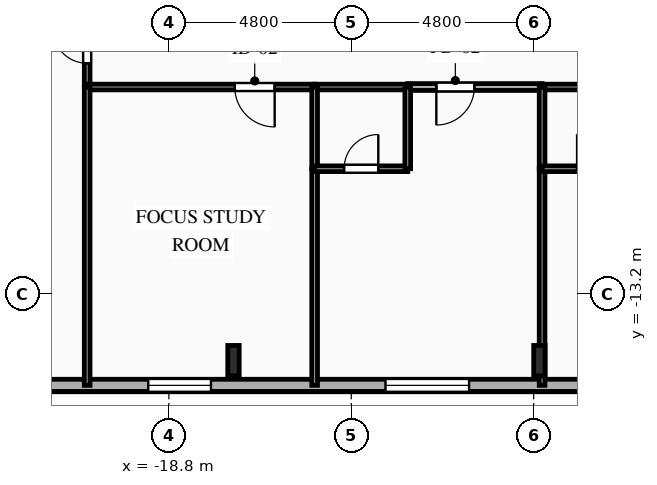
"""IFC4 building model, lengths in metres.
Left out: names, types, materials, properties, quantities, classifications, styles, units other than length and angle.
Written with IfcOpenShell. Run it as: python <this file> out.ifc"""

import sys

from ifc_helpers import new_model, si_unit, direction, frame, frame_2d, origin, origin_2d, place, context, subcontext, project, spatial, rectangle, i_section, extrude, element, fill, save


model = new_model("IFC4")
c1 = context("Model", 3, precision=1e-05, world=origin(), true_north=direction((0.0, 1.0)))
c2 = subcontext(c1, "Body", "Model", "MODEL_VIEW")
j1 = project(units=[si_unit("LENGTHUNIT", "METRE"), si_unit("PLANEANGLEUNIT", "RADIAN")], contexts=[c1])
p1 = place(None, origin())
s1 = spatial("IfcSite", under=j1, at=p1, CompositionType="ELEMENT")
p2 = place(p1, origin())
s2 = spatial("IfcBuilding", under=s1, at=p2, CompositionType="ELEMENT")
p3 = place(p2, frame((0.0, 0.0, 147.75)))
s3 = spatial("IfcBuildingStorey", under=s2, at=p3, CompositionType="ELEMENT", Elevation=147.75)
for number, where, z_axis, x_axis in (
    (1, (-17.1, -14.95, 0.0), (0.0, 0.0, 1.0), (1.0, 0.0, 0.0)),
    (2, (-9.05, -14.95, 0.0), (0.0, 0.0, 1.0), (1.0, 0.0, 0.0)),
):
    element("IfcColumn", number, at=place(p3, frame(where, z_axis=z_axis, x_axis=x_axis)), inside=s3, PredefinedType="COLUMN", context=c2, shape_type="SweptSolid", body=[
        extrude(i_section(OverallWidth=0.3, OverallDepth=0.8, WebThickness=0.018, FlangeThickness=0.033, FilletRadius=0.03, at=origin_2d()), origin(), (0.0, 0.0, 1.0), 3.35),
    ])
p4 = place(p3, frame((23.8, -15.6, 0.0), z_axis=(0.0, 0.0, 1.0), x_axis=(-1.0, 0.0, 0.0)))
e3 = element("IfcWall", 3, at=p4, inside=s3, PredefinedType="SOLIDWALL", context=c2, shape_type="SweptSolid", body=[
    extrude(rectangle(XDim=49.6, YDim=0.32, at=frame_2d((24.8, 0.0))), origin(), (0.0, 0.0, 1.0), 3.04),
])
p5 = place(p4, frame((1.13, 0.0, 0.85)))
e4 = element("IfcOpeningElement", 4, at=p5, cuts=e3, PredefinedType="OPENING", context=c2, shape_type="SweptSolid", body=[
    extrude(rectangle(XDim=1.1, YDim=1.85, at=frame_2d((0.55, 0.925))), frame((0.0, 0.17, 0.0), z_axis=(0.0, -1.0, 0.0), x_axis=(1.0, 0.0, 0.0)), (0.0, 0.0, 1.0), 0.34),
])
p6 = place(p4, frame((5.055, 0.0, 0.85)))
e5 = element("IfcOpeningElement", 5, at=p6, cuts=e3, PredefinedType="OPENING", context=c2, shape_type="SweptSolid", body=[
    extrude(rectangle(XDim=1.65, YDim=1.85, at=frame_2d((0.825, 0.925))), frame((0.0, 0.17, 0.0), z_axis=(0.0, -1.0, 0.0), x_axis=(1.0, 0.0, 0.0)), (0.0, 0.0, 1.0), 0.34),
])
p7 = place(p4, frame((10.78, 0.0, 0.85)))
e6 = element("IfcOpeningElement", 6, at=p7, cuts=e3, PredefinedType="OPENING", context=c2, shape_type="SweptSolid", body=[
    extrude(rectangle(XDim=2.2, YDim=1.85, at=frame_2d((1.1, 0.925))), frame((0.0, 0.17, 0.0), z_axis=(0.0, -1.0, 0.0), x_axis=(1.0, 0.0, 0.0)), (0.0, 0.0, 1.0), 0.34),
])
p8 = place(p4, frame((17.284, 0.0, 0.85)))
e7 = element("IfcOpeningElement", 7, at=p8, cuts=e3, PredefinedType="OPENING", context=c2, shape_type="SweptSolid", body=[
    extrude(rectangle(XDim=2.2, YDim=1.85, at=frame_2d((1.1, 0.925))), frame((0.0, 0.17, 0.0), z_axis=(0.0, -1.0, 0.0), x_axis=(1.0, 0.0, 0.0)), (0.0, 0.0, 1.0), 0.34),
])
p9 = place(p4, frame((22.248, 0.0, 0.85)))
e8 = element("IfcOpeningElement", 8, at=p9, cuts=e3, PredefinedType="OPENING", context=c2, shape_type="SweptSolid", body=[
    extrude(rectangle(XDim=2.2, YDim=1.85, at=frame_2d((1.1, 0.925))), frame((0.0, 0.17, 0.0), z_axis=(0.0, -1.0, 0.0), x_axis=(1.0, 0.0, 0.0)), (0.0, 0.0, 1.0), 0.34),
])
p10 = place(p4, frame((28.7, 0.0, 0.85)))
e9 = element("IfcOpeningElement", 9, at=p10, cuts=e3, PredefinedType="OPENING", context=c2, shape_type="SweptSolid", body=[
    extrude(rectangle(XDim=2.2, YDim=1.85, at=frame_2d((1.1, 0.925))), frame((0.0, 0.17, 0.0), z_axis=(0.0, -1.0, 0.0), x_axis=(1.0, 0.0, 0.0)), (0.0, 0.0, 1.0), 0.34),
])
p11 = place(p4, frame((34.7, 0.0, 0.85)))
e10 = element("IfcOpeningElement", 10, at=p11, cuts=e3, PredefinedType="OPENING", context=c2, shape_type="SweptSolid", body=[
    extrude(rectangle(XDim=2.2, YDim=1.85, at=frame_2d((1.1, 0.925))), frame((0.0, 0.17, 0.0), z_axis=(0.0, -1.0, 0.0), x_axis=(1.0, 0.0, 0.0)), (0.0, 0.0, 1.0), 0.34),
])
p12 = place(p4, frame((41.492, 0.0, 0.85)))
e11 = element("IfcOpeningElement", 11, at=p12, cuts=e3, PredefinedType="OPENING", context=c2, shape_type="SweptSolid", body=[
    extrude(rectangle(XDim=1.65, YDim=1.85, at=frame_2d((0.825, 0.925))), frame((0.0, 0.17, 0.0), z_axis=(0.0, -1.0, 0.0), x_axis=(1.0, 0.0, 0.0)), (0.0, 0.0, 1.0), 0.34),
])
p13 = place(p4, frame((46.175, 0.0, 0.85)))
e12 = element("IfcOpeningElement", 12, at=p13, cuts=e3, PredefinedType="OPENING", context=c2, shape_type="SweptSolid", body=[
    extrude(rectangle(XDim=1.65, YDim=1.85, at=frame_2d((0.825, 0.925))), frame((0.0, 0.17, 0.0), z_axis=(0.0, -1.0, 0.0), x_axis=(1.0, 0.0, 0.0)), (0.0, 0.0, 1.0), 0.34),
])
p14 = place(p3, frame((-20.95, -7.75, 0.0), z_axis=(0.0, 0.0, 1.0), x_axis=(0.0, 1.0, 0.0)))
e13 = element("IfcWall", 13, at=p14, inside=s3, PredefinedType="PARTITIONING", context=c2, shape_type="SweptSolid", body=[
    extrude(rectangle(XDim=2.15, YDim=0.15, at=frame_2d((1.075, 0.0))), origin(), (0.0, 0.0, 1.0), 3.04),
])
p15 = place(p14, frame((0.625, 0.0, 0.0)))
e14 = element("IfcOpeningElement", 14, at=p15, cuts=e13, PredefinedType="OPENING", context=c2, shape_type="SweptSolid", body=[
    extrude(rectangle(XDim=0.9, YDim=2.1, at=frame_2d((0.45, 1.05))), frame((0.0, 0.085, 0.0), z_axis=(0.0, -1.0, 0.0), x_axis=(1.0, 0.0, 0.0)), (0.0, 0.0, 1.0), 0.17),
])
p16 = place(p3, frame((-14.964, -7.75, 0.0), z_axis=(0.0, 0.0, 1.0), x_axis=(-1.0, 0.0, 0.0)))
e15 = element("IfcWall", 15, at=p16, inside=s3, PredefinedType="PARTITIONING", context=c2, shape_type="SweptSolid", body=[
    extrude(rectangle(XDim=5.986, YDim=0.15, at=frame_2d((2.993, 0.0))), origin(), (0.0, 0.0, 1.0), 3.04),
])
p17 = place(p16, frame((1.052, 0.0, 0.0)))
e16 = element("IfcOpeningElement", 16, at=p17, cuts=e15, PredefinedType="OPENING", context=c2, shape_type="SweptSolid", body=[
    extrude(rectangle(XDim=1.05, YDim=2.15, at=frame_2d((0.525, 1.075))), frame((0.0, 0.085, 0.0), z_axis=(0.0, -1.0, 0.0), x_axis=(1.0, 0.0, 0.0)), (0.0, 0.0, 1.0), 0.17),
])
p18 = place(p3, frame((-8.979, -7.75, 0.0), z_axis=(0.0, 0.0, 1.0), x_axis=(-1.0, 0.0, 0.0)))
e17 = element("IfcWall", 17, at=p18, inside=s3, PredefinedType="PARTITIONING", context=c2, shape_type="SweptSolid", body=[
    extrude(rectangle(XDim=3.535, YDim=0.18, at=frame_2d((1.768, 0.0))), origin(), (0.0, 0.0, 1.0), 3.04),
])
p19 = place(p18, frame((1.783, 0.0, 0.0)))
e18 = element("IfcOpeningElement", 18, at=p19, cuts=e17, PredefinedType="OPENING", context=c2, shape_type="SweptSolid", body=[
    extrude(rectangle(XDim=1.0, YDim=2.15, at=frame_2d((0.5, 1.075))), frame((0.0, 0.1, 0.0), z_axis=(0.0, -1.0, 0.0), x_axis=(1.0, 0.0, 0.0)), (0.0, 0.0, 1.0), 0.2),
])
p20 = place(p3, frame((-12.514, -7.75, 0.0), z_axis=(0.0, 0.0, 1.0), x_axis=(-1.0, 0.0, 0.0)))
e19 = element("IfcWall", 19, at=p20, inside=s3, PredefinedType="PLUMBINGWALL", context=c2, shape_type="SweptSolid", body=[
    extrude(rectangle(XDim=2.45, YDim=0.15, at=frame_2d((1.225, 0.0))), origin(), (0.0, 0.0, 1.0), 3.04),
])
p21 = place(p3, frame((-6.529, -7.75, 0.0), z_axis=(0.0, 0.0, 1.0), x_axis=(-1.0, 0.0, 0.0)))
e20 = element("IfcWall", 20, at=p21, inside=s3, PredefinedType="PLUMBINGWALL", context=c2, shape_type="SweptSolid", body=[
    extrude(rectangle(XDim=2.45, YDim=0.15, at=frame_2d((1.225, 0.0))), origin(), (0.0, 0.0, 1.0), 3.04),
])
p22 = place(p3, frame((-20.95, -7.75, 0.0), z_axis=(0.0, 0.0, 1.0), x_axis=(0.0, -1.0, 0.0)))
e21 = element("IfcWall", 21, at=p22, inside=s3, PredefinedType="PARTITIONING", context=c2, shape_type="SweptSolid", body=[
    extrude(rectangle(XDim=7.85, YDim=0.15, at=frame_2d((3.925, 0.0))), origin(), (0.0, 0.0, 1.0), 3.04),
])
p23 = place(p3, frame((-14.964, -9.9, 0.0), z_axis=(0.0, 0.0, 1.0), x_axis=(0.0, -1.0, 0.0)))
e22 = element("IfcWall", 22, at=p23, inside=s3, PredefinedType="PARTITIONING", context=c2, shape_type="SweptSolid", body=[
    extrude(rectangle(XDim=5.7, YDim=0.15, at=frame_2d((2.85, 0.0))), origin(), (0.0, 0.0, 1.0), 3.04),
])
p24 = place(p3, frame((-14.964, -7.75, 0.0), z_axis=(0.0, 0.0, 1.0), x_axis=(0.0, -1.0, 0.0)))
e23 = element("IfcWall", 23, at=p24, inside=s3, PredefinedType="PLUMBINGWALL", context=c2, shape_type="SweptSolid", body=[
    extrude(rectangle(XDim=2.15, YDim=0.15, at=frame_2d((1.075, 0.0))), origin(), (0.0, 0.0, 1.0), 3.04),
])
p25 = place(p3, frame((-14.964, -9.9, 0.0), z_axis=(0.0, 0.0, 1.0), x_axis=(1.0, 0.0, 0.0)))
e24 = element("IfcWall", 24, at=p25, inside=s3, PredefinedType="PLUMBINGWALL", context=c2, shape_type="SweptSolid", body=[
    extrude(rectangle(XDim=2.45, YDim=0.15, at=frame_2d((1.225, 0.0))), origin(), (0.0, 0.0, 1.0), 3.04),
])
p26 = place(p25, frame((0.775, 0.0, 0.0)))
e25 = element("IfcOpeningElement", 25, at=p26, cuts=e24, PredefinedType="OPENING", context=c2, shape_type="SweptSolid", body=[
    extrude(rectangle(XDim=0.9, YDim=2.1, at=frame_2d((0.45, 1.05))), frame((0.0, 0.085, 0.0), z_axis=(0.0, -1.0, 0.0), x_axis=(1.0, 0.0, 0.0)), (0.0, 0.0, 1.0), 0.17),
])
p27 = place(p3, frame((-12.514, -9.9, 0.0), z_axis=(0.0, 0.0, 1.0), x_axis=(0.0, 1.0, 0.0)))
e26 = element("IfcWall", 26, at=p27, inside=s3, PredefinedType="PLUMBINGWALL", context=c2, shape_type="SweptSolid", body=[
    extrude(rectangle(XDim=2.15, YDim=0.15, at=frame_2d((1.075, 0.0))), origin(), (0.0, 0.0, 1.0), 3.04),
])
p28 = place(p3, frame((-8.979, -9.9, 0.0), z_axis=(0.0, 0.0, 1.0), x_axis=(0.0, -1.0, 0.0)))
e27 = element("IfcWall", 27, at=p28, inside=s3, PredefinedType="PARTITIONING", context=c2, shape_type="SweptSolid", body=[
    extrude(rectangle(XDim=5.7, YDim=0.15, at=frame_2d((2.85, 0.0))), origin(), (0.0, 0.0, 1.0), 2.525),
])
p29 = place(p3, frame((-8.979, -7.75, 0.0), z_axis=(0.0, 0.0, 1.0), x_axis=(0.0, -1.0, 0.0)))
e28 = element("IfcWall", 28, at=p29, inside=s3, PredefinedType="PLUMBINGWALL", context=c2, shape_type="SweptSolid", body=[
    extrude(rectangle(XDim=2.15, YDim=0.15, at=frame_2d((1.075, 0.0))), origin(), (0.0, 0.0, 1.0), 2.525),
])
p30 = place(p3, frame((-8.979, -9.9, 0.0), z_axis=(0.0, 0.0, 1.0), x_axis=(1.0, 0.0, 0.0)))
e29 = element("IfcWall", 29, at=p30, inside=s3, PredefinedType="PLUMBINGWALL", context=c2, shape_type="SweptSolid", body=[
    extrude(rectangle(XDim=2.45, YDim=0.15, at=frame_2d((1.225, 0.0))), origin(), (0.0, 0.0, 1.0), 3.04),
])
p31 = place(p30, frame((0.921, 0.0, 0.0)))
e30 = element("IfcOpeningElement", 30, at=p31, cuts=e29, PredefinedType="OPENING", context=c2, shape_type="SweptSolid", body=[
    extrude(rectangle(XDim=0.9, YDim=2.1, at=frame_2d((0.45, 1.05))), frame((0.0, 0.085, 0.0), z_axis=(0.0, -1.0, 0.0), x_axis=(1.0, 0.0, 0.0)), (0.0, 0.0, 1.0), 0.17),
])
p32 = place(p11, origin())
e31 = element("IfcWindow", 31, at=p32, inside=s3, PartitioningType="SINGLE_PANEL", PredefinedType="WINDOW", context=c2, shape_type="SweptSolid", body=[
    extrude(rectangle(XDim=2.2, YDim=1.85, at=frame_2d((1.1, 0.925))), frame((0.0, 0.03, 0.0), z_axis=(0.0, -1.0, 0.0), x_axis=(1.0, 0.0, 0.0)), (0.0, 0.0, 1.0), 0.06),
])
fill(e10, e31)
p33 = place(p12, origin())
e32 = element("IfcWindow", 32, at=p33, inside=s3, PartitioningType="SINGLE_PANEL", PredefinedType="WINDOW", context=c2, shape_type="SweptSolid", body=[
    extrude(rectangle(XDim=1.65, YDim=1.85, at=frame_2d((0.825, 0.925))), frame((0.0, 0.03, 0.0), z_axis=(0.0, -1.0, 0.0), x_axis=(1.0, 0.0, 0.0)), (0.0, 0.0, 1.0), 0.06),
])
fill(e11, e32)
p34 = place(p15, origin())
e33 = element("IfcDoor", 33, at=p34, inside=s3, OperationType="SINGLE_SWING_RIGHT", PredefinedType="DOOR", context=c2, shape_type="SweptSolid", body=[
    extrude(rectangle(XDim=0.9, YDim=2.1, at=frame_2d((0.45, 1.05))), frame((0.0, 0.025, 0.0), z_axis=(0.0, -1.0, 0.0), x_axis=(1.0, 0.0, 0.0)), (0.0, 0.0, 1.0), 0.05),
])
fill(e14, e33)
p35 = place(p17, origin())
e34 = element("IfcDoor", 34, at=p35, inside=s3, OperationType="SINGLE_SWING_LEFT", PredefinedType="DOOR", context=c2, shape_type="SweptSolid", body=[
    extrude(rectangle(XDim=1.05, YDim=2.15, at=frame_2d((0.525, 1.075))), frame((0.0, 0.025, 0.0), z_axis=(0.0, -1.0, 0.0), x_axis=(1.0, 0.0, 0.0)), (0.0, 0.0, 1.0), 0.05),
])
fill(e16, e34)
p36 = place(p19, origin())
e35 = element("IfcDoor", 35, at=p36, inside=s3, OperationType="SINGLE_SWING_RIGHT", PredefinedType="DOOR", context=c2, shape_type="SweptSolid", body=[
    extrude(rectangle(XDim=1.0, YDim=2.15, at=frame_2d((0.5, 1.075))), frame((0.0, 0.025, 0.0), z_axis=(0.0, -1.0, 0.0), x_axis=(1.0, 0.0, 0.0)), (0.0, 0.0, 1.0), 0.05),
])
fill(e18, e35)
p37 = place(p26, origin())
e36 = element("IfcDoor", 36, at=p37, inside=s3, OperationType="SINGLE_SWING_RIGHT", PredefinedType="DOOR", context=c2, shape_type="SweptSolid", body=[
    extrude(rectangle(XDim=0.9, YDim=2.1, at=frame_2d((0.45, 1.05))), frame((0.0, 0.025, 0.0), z_axis=(0.0, -1.0, 0.0), x_axis=(1.0, 0.0, 0.0)), (0.0, 0.0, 1.0), 0.05),
])
fill(e25, e36)
p38 = place(p31, origin())
e37 = element("IfcDoor", 37, at=p38, inside=s3, OperationType="SINGLE_SWING_LEFT", PredefinedType="DOOR", context=c2, shape_type="SweptSolid", body=[
    extrude(rectangle(XDim=0.9, YDim=2.1, at=frame_2d((0.45, 1.05))), frame((0.0, 0.025, 0.0), z_axis=(0.0, -1.0, 0.0), x_axis=(1.0, 0.0, 0.0)), (0.0, 0.0, 1.0), 0.05),
])
fill(e30, e37)
save(model, sys.argv[1])
